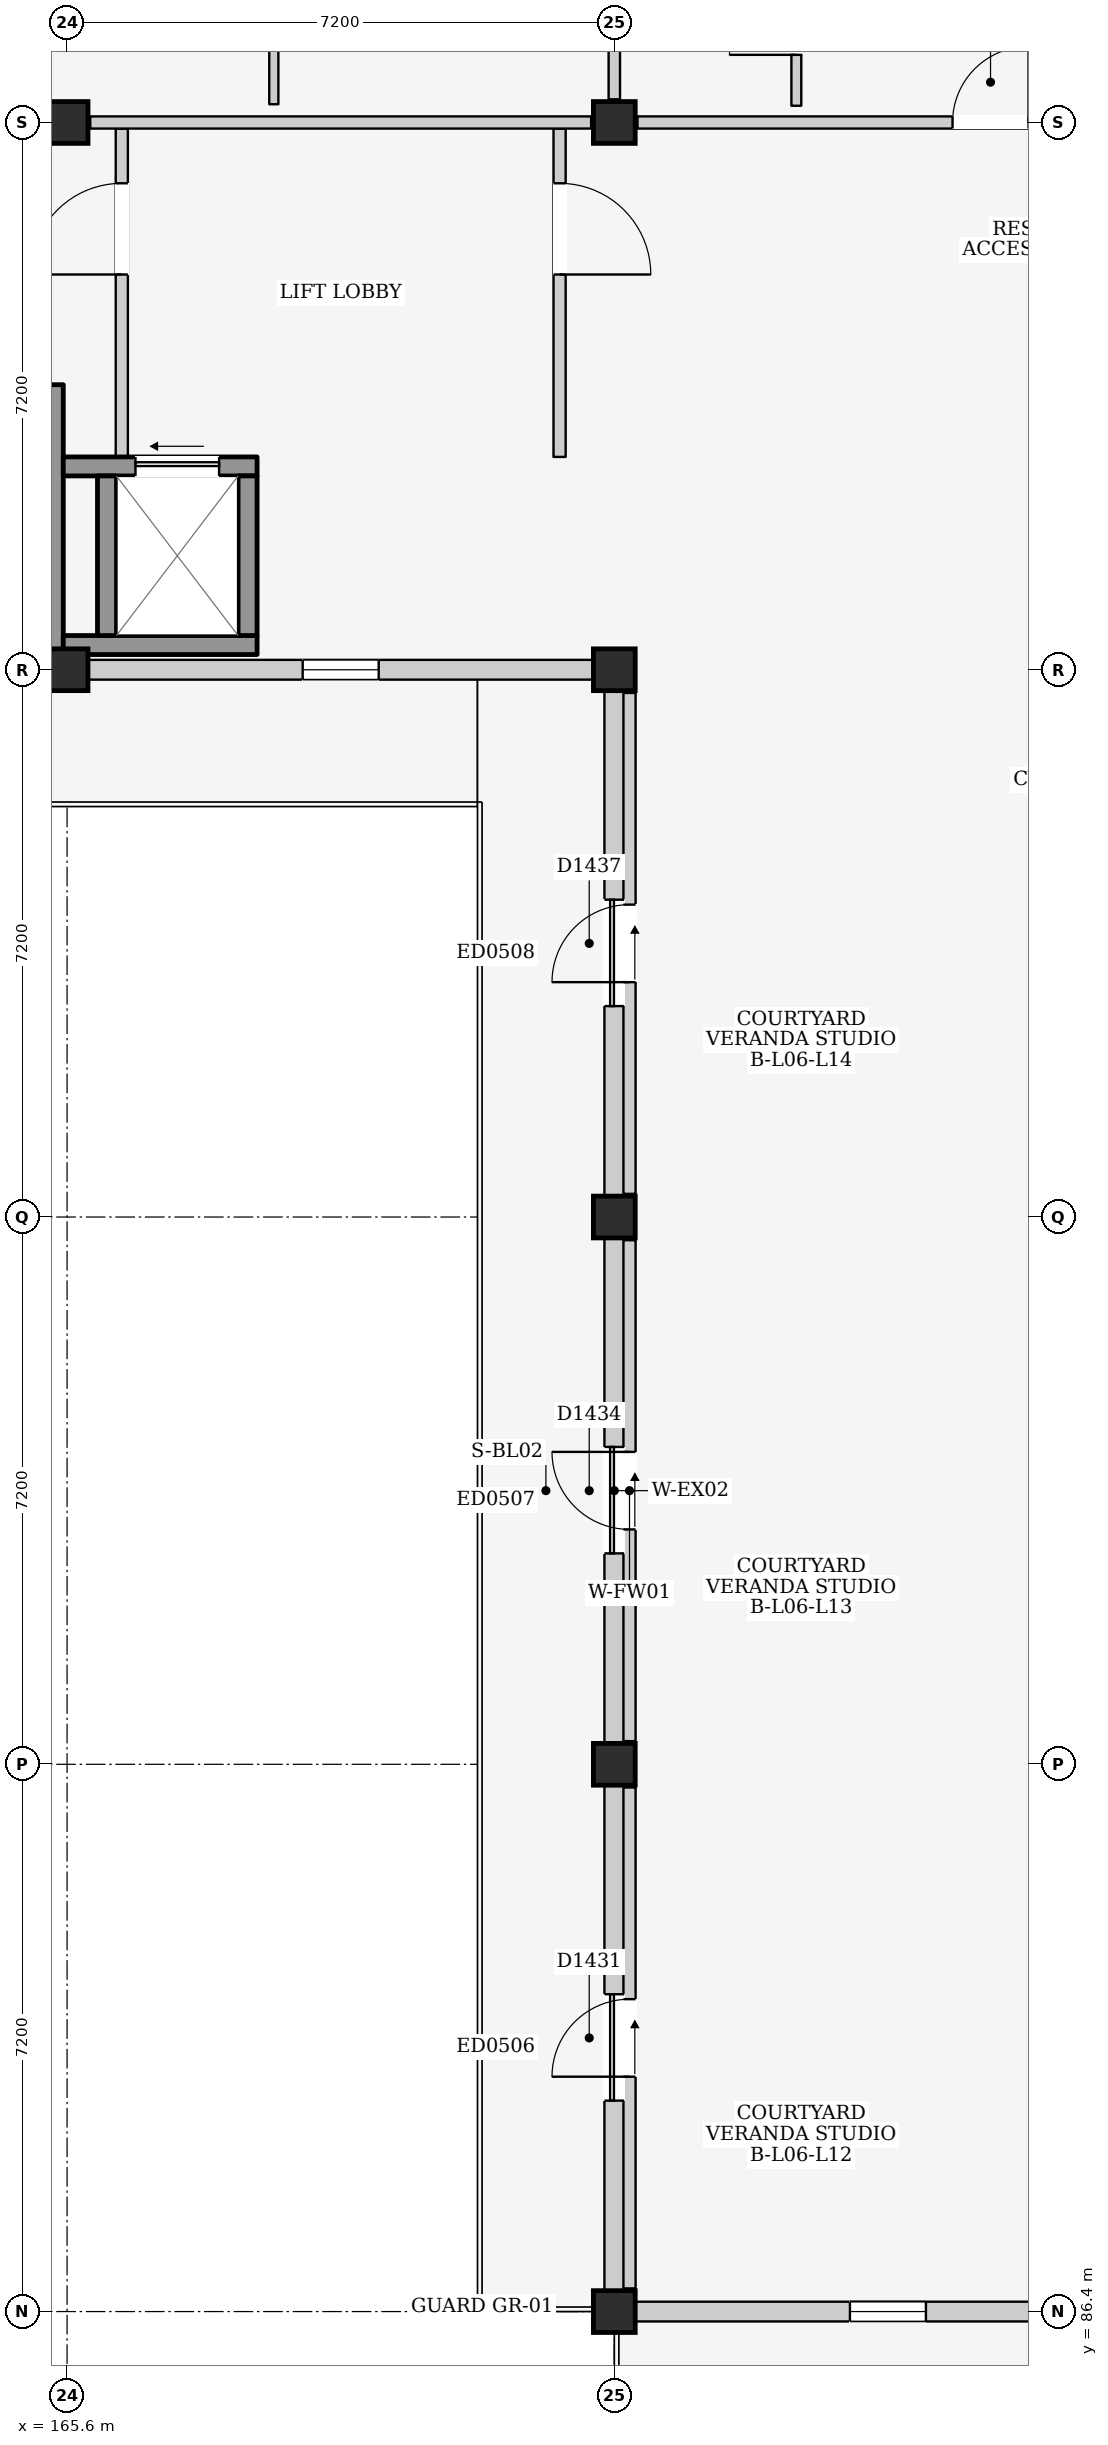
"""IFC4 building model, lengths in metres.
Left out: names, types, materials, properties, quantities, classifications, styles, units other than length and angle.
Written with IfcOpenShell. Run it as: python <this file> out.ifc"""

import sys

from ifc_helpers import new_model, si_unit, direction, frame, frame_2d, origin, origin_2d, place, context, subcontext, project, spatial, rectangle, extrude, element, fill, save


model = new_model("IFC4")
c1 = context("Model", 3, precision=1e-05, world=origin(), true_north=direction((0.0, 1.0)))
c2 = subcontext(c1, "Body", "Model", "MODEL_VIEW")
j1 = project(units=[si_unit("LENGTHUNIT", "METRE"), si_unit("PLANEANGLEUNIT", "RADIAN")], contexts=[c1])
p1 = place(None, origin())
s1 = spatial("IfcSite", under=j1, at=p1, CompositionType="ELEMENT")
p2 = place(p1, origin())
s2 = spatial("IfcBuilding", under=s1, at=p2, CompositionType="ELEMENT")
p3 = place(p2, frame((0.0, 0.0, 21.9)))
s3 = spatial("IfcBuildingStorey", under=s2, at=p3, CompositionType="ELEMENT", Elevation=21.9)
for number, where, z_axis, x_axis in (
    (1, (165.6, 108.0, 0.0), (0.0, 0.0, 1.0), (1.0, 0.0, 0.0)),
    (2, (165.6, 115.2, 0.0), (0.0, 0.0, 1.0), (1.0, 0.0, 0.0)),
    (3, (172.8, 86.4, 0.0), (0.0, 0.0, 1.0), (1.0, 0.0, 0.0)),
    (4, (172.8, 93.6, 0.0), (0.0, 0.0, 1.0), (1.0, 0.0, 0.0)),
    (5, (172.8, 100.8, 0.0), (0.0, 0.0, 1.0), (1.0, 0.0, 0.0)),
    (6, (172.8, 108.0, 0.0), (0.0, 0.0, 1.0), (1.0, 0.0, 0.0)),
    (7, (172.8, 115.2, 0.0), (0.0, 0.0, 1.0), (1.0, 0.0, 0.0)),
):
    element("IfcColumn", number, at=place(p3, frame(where, z_axis=z_axis, x_axis=x_axis)), inside=s3, PredefinedType="COLUMN", context=c2, shape_type="SweptSolid", body=[
        extrude(rectangle(XDim=0.55, YDim=0.55, at=origin_2d()), origin(), (0.0, 0.0, 1.0), 3.2),
    ])
p4 = place(p3, frame((165.875, 108.0, 0.0), z_axis=(0.0, 0.0, 1.0), x_axis=(1.0, 0.0, 0.0)))
e8 = element("IfcWall", 8, at=p4, inside=s3, PredefinedType="ELEMENTEDWALL", context=c2, shape_type="SweptSolid", body=[
    extrude(rectangle(XDim=6.65, YDim=0.26, at=frame_2d((3.325, 0.0))), origin(), (0.0, 0.0, 1.0), 2.365),
])
p5 = place(p4, frame((2.825, 0.0, 1.2)))
e9 = element("IfcOpeningElement", 9, at=p5, cuts=e8, PredefinedType="OPENING", context=c2, shape_type="SweptSolid", body=[
    extrude(rectangle(XDim=1.0, YDim=0.9, at=frame_2d((0.5, 0.45))), frame((0.0, 0.145, 0.0), z_axis=(0.0, -1.0, 0.0), x_axis=(1.0, 0.0, 0.0)), (0.0, 0.0, 1.0), 0.29),
])
p6 = place(p3, frame((173.075, 86.4, 0.0), z_axis=(0.0, 0.0, 1.0), x_axis=(1.0, 0.0, 0.0)))
e10 = element("IfcWall", 10, at=p6, inside=s3, PredefinedType="ELEMENTEDWALL", context=c2, shape_type="SweptSolid", body=[
    extrude(rectangle(XDim=6.65, YDim=0.26, at=frame_2d((3.325, 0.0))), origin(), (0.0, 0.0, 1.0), 2.365),
])
p7 = place(p6, frame((2.825, 0.0, 1.1)))
e11 = element("IfcOpeningElement", 11, at=p7, cuts=e10, PredefinedType="OPENING", context=c2, shape_type="SweptSolid", body=[
    extrude(rectangle(XDim=1.0, YDim=0.9, at=frame_2d((0.5, 0.45))), frame((0.0, 0.145, 0.0), z_axis=(0.0, -1.0, 0.0), x_axis=(1.0, 0.0, 0.0)), (0.0, 0.0, 1.0), 0.29),
])
p8 = place(p3, frame((172.8, 86.675, 0.0), z_axis=(0.0, 0.0, 1.0), x_axis=(0.0, 1.0, 0.0)))
e12 = element("IfcWall", 12, at=p8, inside=s3, PredefinedType="ELEMENTEDWALL", context=c2, shape_type="SweptSolid", body=[
    extrude(rectangle(XDim=6.65, YDim=0.26, at=frame_2d((3.325, 0.0))), origin(), (0.0, 0.0, 1.0), 2.465),
])
p9 = place(p8, frame((2.5, 0.0, 0.0)))
e13 = element("IfcOpeningElement", 13, at=p9, cuts=e12, PredefinedType="OPENING", context=c2, shape_type="SweptSolid", body=[
    extrude(rectangle(XDim=1.4, YDim=2.1, at=frame_2d((0.7, 1.05))), frame((0.0, 0.145, 0.0), z_axis=(0.0, -1.0, 0.0), x_axis=(1.0, 0.0, 0.0)), (0.0, 0.0, 1.0), 0.29),
])
p10 = place(p3, frame((172.8, 93.875, 0.0), z_axis=(0.0, 0.0, 1.0), x_axis=(0.0, 1.0, 0.0)))
e14 = element("IfcWall", 14, at=p10, inside=s3, PredefinedType="ELEMENTEDWALL", context=c2, shape_type="SweptSolid", body=[
    extrude(rectangle(XDim=6.65, YDim=0.26, at=frame_2d((3.325, 0.0))), origin(), (0.0, 0.0, 1.0), 2.465),
])
p11 = place(p10, frame((2.5, 0.0, 0.0)))
e15 = element("IfcOpeningElement", 15, at=p11, cuts=e14, PredefinedType="OPENING", context=c2, shape_type="SweptSolid", body=[
    extrude(rectangle(XDim=1.4, YDim=2.1, at=frame_2d((0.7, 1.05))), frame((0.0, 0.145, 0.0), z_axis=(0.0, -1.0, 0.0), x_axis=(1.0, 0.0, 0.0)), (0.0, 0.0, 1.0), 0.29),
])
p12 = place(p3, frame((172.8, 101.075, 0.0), z_axis=(0.0, 0.0, 1.0), x_axis=(0.0, 1.0, 0.0)))
e16 = element("IfcWall", 16, at=p12, inside=s3, PredefinedType="ELEMENTEDWALL", context=c2, shape_type="SweptSolid", body=[
    extrude(rectangle(XDim=6.65, YDim=0.26, at=frame_2d((3.325, 0.0))), origin(), (0.0, 0.0, 1.0), 2.465),
])
p13 = place(p12, frame((2.5, 0.0, 0.0)))
e17 = element("IfcOpeningElement", 17, at=p13, cuts=e16, PredefinedType="OPENING", context=c2, shape_type="SweptSolid", body=[
    extrude(rectangle(XDim=1.4, YDim=2.1, at=frame_2d((0.7, 1.05))), frame((0.0, 0.145, 0.0), z_axis=(0.0, -1.0, 0.0), x_axis=(1.0, 0.0, 0.0)), (0.0, 0.0, 1.0), 0.29),
])
p14 = place(p3, frame((165.4, 108.15, 0.0), z_axis=(0.0, 0.0, 1.0), x_axis=(0.0, 1.0, 0.0)))
e18 = element("IfcWall", 18, at=p14, inside=s3, PredefinedType="SHEAR", context=c2, shape_type="SweptSolid", body=[
    extrude(rectangle(XDim=3.6, YDim=0.3, at=frame_2d((1.8, 0.0))), origin(), (0.0, 0.0, 1.0), 2.98),
])
p15 = place(p3, frame((166.32, 110.8, 0.0), z_axis=(0.0, 0.0, 1.0), x_axis=(0.0, 1.0, 0.0)))
e19 = element("IfcWall", 19, at=p15, inside=s3, PredefinedType="PARTITIONING", context=c2, shape_type="SweptSolid", body=[
    extrude(rectangle(XDim=4.32, YDim=0.16, at=frame_2d((2.16, 0.0))), origin(), (0.0, 0.0, 1.0), 2.98),
])
p16 = place(p15, frame((2.4, 0.0, 0.0)))
e20 = element("IfcOpeningElement", 20, at=p16, cuts=e19, PredefinedType="OPENING", context=c2, shape_type="SweptSolid", body=[
    extrude(rectangle(XDim=1.2, YDim=2.2, at=frame_2d((0.6, 1.1))), frame((0.0, 0.095, 0.0), z_axis=(0.0, -1.0, 0.0), x_axis=(1.0, 0.0, 0.0)), (0.0, 0.0, 1.0), 0.19),
])
p17 = place(p3, frame((172.08, 110.8, 0.0), z_axis=(0.0, 0.0, 1.0), x_axis=(0.0, 1.0, 0.0)))
e21 = element("IfcWall", 21, at=p17, inside=s3, PredefinedType="PARTITIONING", context=c2, shape_type="SweptSolid", body=[
    extrude(rectangle(XDim=4.32, YDim=0.16, at=frame_2d((2.16, 0.0))), origin(), (0.0, 0.0, 1.0), 2.98),
])
p18 = place(p17, frame((2.4, 0.0, 0.0)))
e22 = element("IfcOpeningElement", 22, at=p18, cuts=e21, PredefinedType="OPENING", context=c2, shape_type="SweptSolid", body=[
    extrude(rectangle(XDim=1.2, YDim=2.2, at=frame_2d((0.6, 1.1))), frame((0.0, 0.095, 0.0), z_axis=(0.0, -1.0, 0.0), x_axis=(1.0, 0.0, 0.0)), (0.0, 0.0, 1.0), 0.19),
])
p19 = place(p3, frame((165.55, 108.325, 0.0), z_axis=(0.0, 0.0, 1.0), x_axis=(1.0, 0.0, 0.0)))
e23 = element("IfcWall", 23, at=p19, inside=s3, PredefinedType="SHEAR", context=c2, shape_type="SweptSolid", body=[
    extrude(rectangle(XDim=2.55, YDim=0.25, at=frame_2d((1.275, 0.0))), origin(), (0.0, 0.0, 1.0), 2.98),
])
p20 = place(p3, frame((165.55, 110.675, 0.0), z_axis=(0.0, 0.0, 1.0), x_axis=(1.0, 0.0, 0.0)))
e24 = element("IfcWall", 24, at=p20, inside=s3, PredefinedType="SHEAR", context=c2, shape_type="SweptSolid", body=[
    extrude(rectangle(XDim=2.55, YDim=0.25, at=frame_2d((1.275, 0.0))), origin(), (0.0, 0.0, 1.0), 2.98),
])
p21 = place(p20, frame((0.95, 0.0, 0.0)))
e25 = element("IfcOpeningElement", 25, at=p21, cuts=e24, PredefinedType="OPENING", context=c2, shape_type="SweptSolid", body=[
    extrude(rectangle(XDim=1.1, YDim=2.15, at=frame_2d((0.55, 1.075))), frame((0.0, 0.14, 0.0), z_axis=(0.0, -1.0, 0.0), x_axis=(1.0, 0.0, 0.0)), (0.0, 0.0, 1.0), 0.28),
])
for number, where, z_axis, x_axis in (
    (26, (166.125, 108.45, 0.0), (0.0, 0.0, 1.0), (0.0, 1.0, 0.0)),
    (27, (167.975, 108.45, 0.0), (0.0, 0.0, 1.0), (0.0, 1.0, 0.0)),
):
    element("IfcWall", number, at=place(p3, frame(where, z_axis=z_axis, x_axis=x_axis)), inside=s3, PredefinedType="SHEAR", context=c2, shape_type="SweptSolid", body=[
        extrude(rectangle(XDim=2.1, YDim=0.25, at=frame_2d((1.05, 0.0))), origin(), (0.0, 0.0, 1.0), 2.98),
    ])
p22 = place(p3, frame((165.905, 115.2, 0.0), z_axis=(0.0, 0.0, 1.0), x_axis=(1.0, 0.0, 0.0)))
e28 = element("IfcWall", 28, at=p22, inside=s3, PredefinedType="PARTITIONING", context=c2, shape_type="SweptSolid", body=[
    extrude(rectangle(XDim=6.59, YDim=0.16, at=frame_2d((3.295, 0.0))), origin(), (0.0, 0.0, 1.0), 2.365),
])
p23 = place(p3, frame((172.8, 115.505, 0.0), z_axis=(0.0, 0.0, 1.0), x_axis=(0.0, 1.0, 0.0)))
e29 = element("IfcWall", 29, at=p23, inside=s3, PredefinedType="PARTITIONING", context=c2, shape_type="SweptSolid", body=[
    extrude(rectangle(XDim=6.59, YDim=0.15, at=frame_2d((3.295, 0.0))), origin(), (0.0, 0.0, 1.0), 2.465),
])
p24 = place(p3, frame((168.32, 115.44, 0.0), z_axis=(0.0, 0.0, 1.0), x_axis=(0.0, 1.0, 0.0)))
e30 = element("IfcWall", 30, at=p24, inside=s3, PredefinedType="PARTITIONING", context=c2, shape_type="SweptSolid", body=[
    extrude(rectangle(XDim=3.04, YDim=0.12, at=frame_2d((1.52, 0.0))), origin(), (0.0, 0.0, 1.0), 2.98),
])
p25 = place(p24, frame((1.04, 0.0, 0.0)))
e31 = element("IfcOpeningElement", 31, at=p25, cuts=e30, PredefinedType="OPENING", context=c2, shape_type="SweptSolid", body=[
    extrude(rectangle(XDim=0.96, YDim=2.15, at=frame_2d((0.48, 1.075))), frame((0.0, 0.075, 0.0), z_axis=(0.0, -1.0, 0.0), x_axis=(1.0, 0.0, 0.0)), (0.0, 0.0, 1.0), 0.15),
])
p26 = place(p3, frame((173.105, 115.2, 0.0), z_axis=(0.0, 0.0, 1.0), x_axis=(1.0, 0.0, 0.0)))
e32 = element("IfcWall", 32, at=p26, inside=s3, PredefinedType="PARTITIONING", context=c2, shape_type="SweptSolid", body=[
    extrude(rectangle(XDim=6.59, YDim=0.16, at=frame_2d((3.295, 0.0))), origin(), (0.0, 0.0, 1.0), 2.365),
])
p27 = place(p26, frame((4.145, 0.0, 0.0)))
e33 = element("IfcOpeningElement", 33, at=p27, cuts=e32, PredefinedType="OPENING", context=c2, shape_type="SweptSolid", body=[
    extrude(rectangle(XDim=1.0, YDim=2.15, at=frame_2d((0.5, 1.075))), frame((0.0, 0.095, 0.0), z_axis=(0.0, -1.0, 0.0), x_axis=(1.0, 0.0, 0.0)), (0.0, 0.0, 1.0), 0.19),
])
p28 = place(p3, frame((175.195, 115.42, 0.0), z_axis=(0.0, 0.0, 1.0), x_axis=(0.0, 1.0, 0.0)))
e34 = element("IfcWall", 34, at=p28, inside=s3, PredefinedType="PARTITIONING", context=c2, shape_type="SweptSolid", body=[
    extrude(rectangle(XDim=2.22, YDim=0.13, at=frame_2d((1.11, 0.0))), origin(), (0.0, 0.0, 1.0), 2.98),
])
p29 = place(p28, frame((0.67, 0.0, 0.0)))
e35 = element("IfcOpeningElement", 35, at=p29, cuts=e34, PredefinedType="OPENING", context=c2, shape_type="SweptSolid", body=[
    extrude(rectangle(XDim=0.88, YDim=2.1, at=frame_2d((0.44, 1.05))), frame((0.0, 0.08, 0.0), z_axis=(0.0, -1.0, 0.0), x_axis=(1.0, 0.0, 0.0)), (0.0, 0.0, 1.0), 0.16),
])
p30 = place(p3, frame((173.0, 86.705, 0.0), z_axis=(0.0, 0.0, 1.0), x_axis=(0.0, 1.0, 0.0)))
e36 = element("IfcWall", 36, at=p30, inside=s3, PredefinedType="PARTITIONING", context=c2, shape_type="SweptSolid", body=[
    extrude(rectangle(XDim=6.59, YDim=0.16, at=frame_2d((3.295, 0.0))), origin(), (0.0, 0.0, 1.0), 2.98),
])
p31 = place(p30, frame((2.785, 0.0, 0.0)))
e37 = element("IfcOpeningElement", 37, at=p31, cuts=e36, PredefinedType="OPENING", context=c2, shape_type="SweptSolid", body=[
    extrude(rectangle(XDim=1.02, YDim=2.18, at=frame_2d((0.51, 1.09))), frame((0.0, 0.095, 0.0), z_axis=(0.0, -1.0, 0.0), x_axis=(1.0, 0.0, 0.0)), (0.0, 0.0, 1.0), 0.19),
])
p32 = place(p3, frame((173.0, 93.905, 0.0), z_axis=(0.0, 0.0, 1.0), x_axis=(0.0, 1.0, 0.0)))
e38 = element("IfcWall", 38, at=p32, inside=s3, PredefinedType="PARTITIONING", context=c2, shape_type="SweptSolid", body=[
    extrude(rectangle(XDim=6.59, YDim=0.16, at=frame_2d((3.295, 0.0))), origin(), (0.0, 0.0, 1.0), 2.98),
])
p33 = place(p32, frame((2.785, 0.0, 0.0)))
e39 = element("IfcOpeningElement", 39, at=p33, cuts=e38, PredefinedType="OPENING", context=c2, shape_type="SweptSolid", body=[
    extrude(rectangle(XDim=1.02, YDim=2.18, at=frame_2d((0.51, 1.09))), frame((0.0, 0.095, 0.0), z_axis=(0.0, -1.0, 0.0), x_axis=(1.0, 0.0, 0.0)), (0.0, 0.0, 1.0), 0.19),
])
p34 = place(p3, frame((173.0, 101.105, 0.0), z_axis=(0.0, 0.0, 1.0), x_axis=(0.0, 1.0, 0.0)))
e40 = element("IfcWall", 40, at=p34, inside=s3, PredefinedType="PARTITIONING", context=c2, shape_type="SweptSolid", body=[
    extrude(rectangle(XDim=6.59, YDim=0.16, at=frame_2d((3.295, 0.0))), origin(), (0.0, 0.0, 1.0), 2.98),
])
p35 = place(p34, frame((2.785, 0.0, 0.0)))
e41 = element("IfcOpeningElement", 41, at=p35, cuts=e40, PredefinedType="OPENING", context=c2, shape_type="SweptSolid", body=[
    extrude(rectangle(XDim=1.02, YDim=2.18, at=frame_2d((0.51, 1.09))), frame((0.0, 0.095, 0.0), z_axis=(0.0, -1.0, 0.0), x_axis=(1.0, 0.0, 0.0)), (0.0, 0.0, 1.0), 0.19),
])
p36 = place(p5, origin())
e42 = element("IfcWindow", 42, at=p36, inside=s3, PartitioningType="SINGLE_PANEL", PredefinedType="WINDOW", context=c2, shape_type="SweptSolid", body=[
    extrude(rectangle(XDim=1.0, YDim=0.9, at=frame_2d((0.5, 0.45))), frame((0.0, 0.03, 0.0), z_axis=(0.0, -1.0, 0.0), x_axis=(1.0, 0.0, 0.0)), (0.0, 0.0, 1.0), 0.06),
])
fill(e9, e42)
p37 = place(p7, origin())
e43 = element("IfcWindow", 43, at=p37, inside=s3, PartitioningType="SINGLE_PANEL", PredefinedType="WINDOW", context=c2, shape_type="SweptSolid", body=[
    extrude(rectangle(XDim=1.0, YDim=0.9, at=frame_2d((0.5, 0.45))), frame((0.0, 0.03, 0.0), z_axis=(0.0, -1.0, 0.0), x_axis=(1.0, 0.0, 0.0)), (0.0, 0.0, 1.0), 0.06),
])
fill(e11, e43)
p38 = place(p9, frame((1.4, 0.0, 0.0), z_axis=(0.0, 0.0, 1.0), x_axis=(-1.0, 0.0, 0.0)))
e44 = element("IfcDoor", 44, at=p38, inside=s3, OperationType="SLIDING_TO_RIGHT", PredefinedType="DOOR", context=c2, shape_type="SweptSolid", body=[
    extrude(rectangle(XDim=1.4, YDim=2.1, at=frame_2d((0.7, 1.05))), frame((0.0, 0.025, 0.0), z_axis=(0.0, -1.0, 0.0), x_axis=(1.0, 0.0, 0.0)), (0.0, 0.0, 1.0), 0.05),
])
fill(e13, e44)
p39 = place(p11, frame((1.4, 0.0, 0.0), z_axis=(0.0, 0.0, 1.0), x_axis=(-1.0, 0.0, 0.0)))
e45 = element("IfcDoor", 45, at=p39, inside=s3, OperationType="SLIDING_TO_RIGHT", PredefinedType="DOOR", context=c2, shape_type="SweptSolid", body=[
    extrude(rectangle(XDim=1.4, YDim=2.1, at=frame_2d((0.7, 1.05))), frame((0.0, 0.025, 0.0), z_axis=(0.0, -1.0, 0.0), x_axis=(1.0, 0.0, 0.0)), (0.0, 0.0, 1.0), 0.05),
])
fill(e15, e45)
p40 = place(p13, frame((1.4, 0.0, 0.0), z_axis=(0.0, 0.0, 1.0), x_axis=(-1.0, 0.0, 0.0)))
e46 = element("IfcDoor", 46, at=p40, inside=s3, OperationType="SLIDING_TO_RIGHT", PredefinedType="DOOR", context=c2, shape_type="SweptSolid", body=[
    extrude(rectangle(XDim=1.4, YDim=2.1, at=frame_2d((0.7, 1.05))), frame((0.0, 0.025, 0.0), z_axis=(0.0, -1.0, 0.0), x_axis=(1.0, 0.0, 0.0)), (0.0, 0.0, 1.0), 0.05),
])
fill(e17, e46)
p41 = place(p16, origin())
e47 = element("IfcDoor", 47, at=p41, inside=s3, OperationType="SINGLE_SWING_LEFT", PredefinedType="DOOR", context=c2, shape_type="SweptSolid", body=[
    extrude(rectangle(XDim=1.2, YDim=2.2, at=frame_2d((0.6, 1.1))), frame((0.0, 0.025, 0.0), z_axis=(0.0, -1.0, 0.0), x_axis=(1.0, 0.0, 0.0)), (0.0, 0.0, 1.0), 0.05),
])
fill(e20, e47)
p42 = place(p18, frame((1.2, 0.0, 0.0), z_axis=(0.0, 0.0, 1.0), x_axis=(-1.0, 0.0, 0.0)))
e48 = element("IfcDoor", 48, at=p42, inside=s3, OperationType="SINGLE_SWING_RIGHT", PredefinedType="DOOR", context=c2, shape_type="SweptSolid", body=[
    extrude(rectangle(XDim=1.2, YDim=2.2, at=frame_2d((0.6, 1.1))), frame((0.0, 0.025, 0.0), z_axis=(0.0, -1.0, 0.0), x_axis=(1.0, 0.0, 0.0)), (0.0, 0.0, 1.0), 0.05),
])
fill(e22, e48)
p43 = place(p21, origin())
e49 = element("IfcDoor", 49, at=p43, inside=s3, OperationType="SLIDING_TO_LEFT", PredefinedType="DOOR", context=c2, shape_type="SweptSolid", body=[
    extrude(rectangle(XDim=1.1, YDim=2.15, at=frame_2d((0.55, 1.075))), frame((0.0, 0.025, 0.0), z_axis=(0.0, -1.0, 0.0), x_axis=(1.0, 0.0, 0.0)), (0.0, 0.0, 1.0), 0.05),
])
fill(e25, e49)
p44 = place(p27, origin())
e50 = element("IfcDoor", 50, at=p44, inside=s3, OperationType="SINGLE_SWING_RIGHT", PredefinedType="DOOR", context=c2, shape_type="SweptSolid", body=[
    extrude(rectangle(XDim=1.0, YDim=2.15, at=frame_2d((0.5, 1.075))), frame((0.0, 0.025, 0.0), z_axis=(0.0, -1.0, 0.0), x_axis=(1.0, 0.0, 0.0)), (0.0, 0.0, 1.0), 0.05),
])
fill(e33, e50)
p45 = place(p29, origin())
e51 = element("IfcDoor", 51, at=p45, inside=s3, OperationType="SINGLE_SWING_LEFT", PredefinedType="DOOR", context=c2, shape_type="SweptSolid", body=[
    extrude(rectangle(XDim=0.88, YDim=2.1, at=frame_2d((0.44, 1.05))), frame((0.0, 0.025, 0.0), z_axis=(0.0, -1.0, 0.0), x_axis=(1.0, 0.0, 0.0)), (0.0, 0.0, 1.0), 0.05),
])
fill(e35, e51)
p46 = place(p31, origin())
e52 = element("IfcDoor", 52, at=p46, inside=s3, OperationType="SINGLE_SWING_LEFT", PredefinedType="DOOR", context=c2, shape_type="SweptSolid", body=[
    extrude(rectangle(XDim=1.02, YDim=2.18, at=frame_2d((0.51, 1.09))), frame((0.0, 0.025, 0.0), z_axis=(0.0, -1.0, 0.0), x_axis=(1.0, 0.0, 0.0)), (0.0, 0.0, 1.0), 0.05),
])
fill(e37, e52)
p47 = place(p33, origin())
e53 = element("IfcDoor", 53, at=p47, inside=s3, OperationType="SINGLE_SWING_RIGHT", PredefinedType="DOOR", context=c2, shape_type="SweptSolid", body=[
    extrude(rectangle(XDim=1.02, YDim=2.18, at=frame_2d((0.51, 1.09))), frame((0.0, 0.025, 0.0), z_axis=(0.0, -1.0, 0.0), x_axis=(1.0, 0.0, 0.0)), (0.0, 0.0, 1.0), 0.05),
])
fill(e39, e53)
p48 = place(p35, origin())
e54 = element("IfcDoor", 54, at=p48, inside=s3, OperationType="SINGLE_SWING_LEFT", PredefinedType="DOOR", context=c2, shape_type="SweptSolid", body=[
    extrude(rectangle(XDim=1.02, YDim=2.18, at=frame_2d((0.51, 1.09))), frame((0.0, 0.025, 0.0), z_axis=(0.0, -1.0, 0.0), x_axis=(1.0, 0.0, 0.0)), (0.0, 0.0, 1.0), 0.05),
])
fill(e41, e54)
save(model, sys.argv[1])
